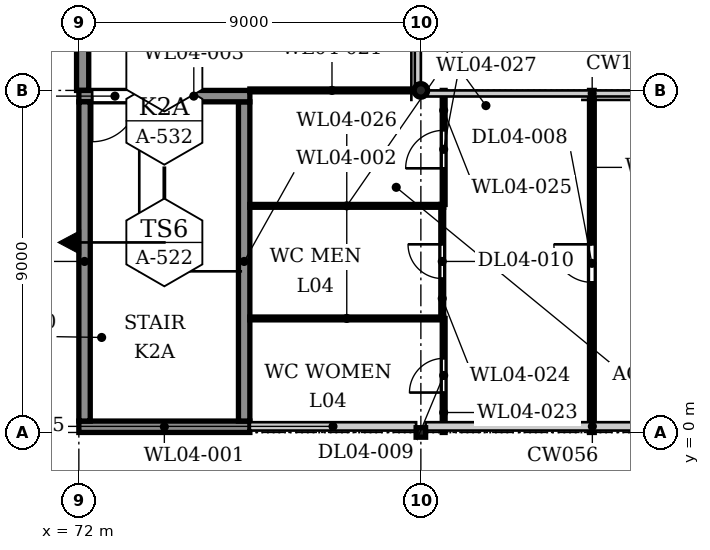
"""IFC4 building model, lengths in metres.
Left out: names, types, materials, properties, quantities, classifications, styles, units other than length and angle.
Written with IfcOpenShell. Run it as: python <this file> out.ifc"""

import sys

from ifc_helpers import new_model, si_unit, direction, frame, frame_2d, origin, origin_2d, place, context, subcontext, project, spatial, polyline, rectangle, hollow_rectangle, hollow_circle, outline, extrude, element, fill, save


model = new_model("IFC4")
c1 = context("Model", 3, precision=1e-05, world=origin(), true_north=direction((0.0, 1.0)))
c2 = subcontext(c1, "Body", "Model", "MODEL_VIEW")
j1 = project(units=[si_unit("LENGTHUNIT", "METRE"), si_unit("PLANEANGLEUNIT", "RADIAN")], contexts=[c1])
p1 = place(None, origin())
s1 = spatial("IfcSite", under=j1, at=p1, CompositionType="ELEMENT")
p2 = place(p1, origin())
s2 = spatial("IfcBuilding", under=s1, at=p2, CompositionType="ELEMENT")
p3 = place(p2, frame((0.0, 0.0, 21.2)))
s3 = spatial("IfcBuildingStorey", under=s2, at=p3, CompositionType="ELEMENT", Elevation=21.2)
p4 = place(p3, frame((81.0, 0.0, 0.0), z_axis=(0.0, 0.0, 1.0), x_axis=(1.0, 0.0, 0.0)))
e1 = element("IfcColumn", 1, at=p4, inside=s3, PredefinedType="COLUMN", context=c2, shape_type="SweptSolid", body=[
    extrude(hollow_rectangle(XDim=0.25, YDim=0.25, WallThickness=0.01, InnerFilletRadius=0.015, OuterFilletRadius=0.025, at=origin_2d()), origin(), (0.0, 0.0, 1.0), 3.6),
])
p5 = place(p3, frame((81.0, 9.0, 0.0), z_axis=(0.0, 0.0, 1.0), x_axis=(1.0, 0.0, 0.0)))
e2 = element("IfcColumn", 2, at=p5, inside=s3, PredefinedType="COLUMN", context=c2, shape_type="SweptSolid", body=[
    extrude(hollow_circle(Radius=0.178, WallThickness=0.013, at=origin_2d()), origin(), (0.0, 0.0, 1.0), 3.6),
])
p6 = place(p3, frame((72.1, 9.0, 0.0), z_axis=(0.0, 0.0, 1.0), x_axis=(0.0, 1.0, 0.0)))
e3 = element("IfcWall", 3, at=p6, inside=s3, PredefinedType="SOLIDWALL", context=c2, shape_type="SweptSolid", body=[
    extrude(rectangle(XDim=8.875, YDim=0.32, at=frame_2d((4.438, 0.0))), origin(), (0.0, 0.0, 1.0), 3.878),
])
p7 = place(p3, frame((72.1, 9.175, 3.878), z_axis=(0.0, 0.0, 1.0), x_axis=(0.0, 1.0, 0.0)))
e4 = element("IfcWall", 4, at=p7, inside=s3, PredefinedType="SOLIDWALL", context=c2, shape_type="SweptSolid", body=[
    extrude(outline(polyline([(0.0, 0.0), (8.825, 0.0), (8.825, 0.05), (0.0, 1.6), (0.0, 0.0)])), frame((0.0, 0.05, 0.0), z_axis=(0.0, -1.0, 0.0), x_axis=(1.0, 0.0, 0.0)), (0.0, 0.0, 1.0), 0.1),
])
p8 = place(p3, frame((72.0, 0.15, 0.0), z_axis=(0.0, 0.0, 1.0), x_axis=(1.0, 0.0, 0.0)))
e5 = element("IfcWall", 5, at=p8, inside=s3, PredefinedType="SOLIDWALL", context=c2, shape_type="SweptSolid", body=[
    extrude(rectangle(XDim=4.5, YDim=0.3, at=frame_2d((2.25, 0.0))), origin(), (0.0, 0.0, 1.0), 3.628),
])
p9 = place(p3, frame((76.35, 0.3, 0.0), z_axis=(0.0, 0.0, 1.0), x_axis=(0.0, 1.0, 0.0)))
e6 = element("IfcWall", 6, at=p9, inside=s3, PredefinedType="SOLIDWALL", context=c2, shape_type="SweptSolid", body=[
    extrude(rectangle(XDim=8.4, YDim=0.3, at=frame_2d((4.2, 0.0))), origin(), (0.0, 0.0, 1.0), 3.628),
])
p10 = place(p3, frame((72.0, 8.85, 0.0), z_axis=(0.0, 0.0, 1.0), x_axis=(1.0, 0.0, 0.0)))
e7 = element("IfcWall", 7, at=p10, inside=s3, PredefinedType="SOLIDWALL", context=c2, shape_type="SweptSolid", body=[
    extrude(rectangle(XDim=4.5, YDim=0.3, at=frame_2d((2.25, 0.0))), origin(), (0.0, 0.0, 1.0), 3.628),
])
p11 = place(p10, frame((0.35, 0.0, 0.0)))
e8 = element("IfcOpeningElement", 8, at=p11, cuts=e7, PredefinedType="OPENING", context=c2, shape_type="SweptSolid", body=[
    extrude(rectangle(XDim=1.2, YDim=2.1, at=frame_2d((0.6, 1.05))), frame((0.0, 0.16, 0.0), z_axis=(0.0, -1.0, 0.0), x_axis=(1.0, 0.0, 0.0)), (0.0, 0.0, 1.0), 0.32),
])
p12 = place(p3, frame((72.15, 0.3, 0.0), z_axis=(0.0, 0.0, 1.0), x_axis=(0.0, 1.0, 0.0)))
e9 = element("IfcWall", 9, at=p12, inside=s3, PredefinedType="SOLIDWALL", context=c2, shape_type="SweptSolid", body=[
    extrude(rectangle(XDim=8.4, YDim=0.3, at=frame_2d((4.2, 0.0))), origin(), (0.0, 0.0, 1.0), 3.628),
])
p13 = place(p3, frame((85.5, 0.0, 0.0), z_axis=(0.0, 0.0, 1.0), x_axis=(0.0, 1.0, 0.0)))
e10 = element("IfcWall", 10, at=p13, inside=s3, PredefinedType="PARTITIONING", context=c2, shape_type="SweptSolid", body=[
    extrude(rectangle(XDim=9.0, YDim=0.125, at=frame_2d((4.5, 0.0))), origin(), (0.0, 0.0, 1.0), 3.54),
])
p14 = place(p13, frame((3.95, 0.0, 0.0)))
e11 = element("IfcOpeningElement", 11, at=p14, cuts=e10, PredefinedType="OPENING", context=c2, shape_type="SweptSolid", body=[
    extrude(rectangle(XDim=1.0, YDim=2.1, at=frame_2d((0.5, 1.05))), frame((0.0, 0.073, 0.0), z_axis=(0.0, -1.0, 0.0), x_axis=(1.0, 0.0, 0.0)), (0.0, 0.0, 1.0), 0.145),
])
p15 = place(p3, frame((76.5, 9.0, 0.0), z_axis=(0.0, 0.0, 1.0), x_axis=(1.0, 0.0, 0.0)))
e12 = element("IfcWall", 12, at=p15, inside=s3, PredefinedType="PARTITIONING", context=c2, shape_type="SweptSolid", body=[
    extrude(rectangle(XDim=4.322, YDim=0.075, at=frame_2d((2.161, 0.0))), origin(), (0.0, 0.0, 1.0), 3.54),
])
p16 = place(p3, frame((81.6, 0.0, 0.0), z_axis=(0.0, 0.0, 1.0), x_axis=(0.0, 1.0, 0.0)))
e13 = element("IfcWall", 13, at=p16, inside=s3, PredefinedType="PARTITIONING", context=c2, shape_type="SweptSolid", body=[
    extrude(rectangle(XDim=3.0, YDim=0.075, at=frame_2d((1.5, 0.0))), origin(), (0.0, 0.0, 1.0), 3.6),
])
p17 = place(p16, frame((1.05, 0.0, 0.0)))
e14 = element("IfcOpeningElement", 14, at=p17, cuts=e13, PredefinedType="OPENING", context=c2, shape_type="SweptSolid", body=[
    extrude(rectangle(XDim=0.9, YDim=2.1, at=frame_2d((0.45, 1.05))), frame((0.0, 0.047, 0.0), z_axis=(0.0, -1.0, 0.0), x_axis=(1.0, 0.0, 0.0)), (0.0, 0.0, 1.0), 0.095),
])
p18 = place(p3, frame((81.562, 3.0, 0.0), z_axis=(0.0, 0.0, 1.0), x_axis=(0.0, 1.0, 0.0)))
e15 = element("IfcWall", 15, at=p18, inside=s3, PredefinedType="PARTITIONING", context=c2, shape_type="SweptSolid", body=[
    extrude(rectangle(XDim=3.0, YDim=0.075, at=frame_2d((1.5, 0.0))), origin(), (0.0, 0.0, 1.0), 4.051),
])
p19 = place(p18, frame((1.05, 0.0, 0.0)))
e16 = element("IfcOpeningElement", 16, at=p19, cuts=e15, PredefinedType="OPENING", context=c2, shape_type="SweptSolid", body=[
    extrude(rectangle(XDim=0.9, YDim=2.1, at=frame_2d((0.45, 1.05))), frame((0.0, 0.047, 0.0), z_axis=(0.0, -1.0, 0.0), x_axis=(1.0, 0.0, 0.0)), (0.0, 0.0, 1.0), 0.095),
])
p20 = place(p3, frame((81.6, 6.0, 0.0), z_axis=(0.0, 0.0, 1.0), x_axis=(0.0, 1.0, 0.0)))
e17 = element("IfcWall", 17, at=p20, inside=s3, PredefinedType="PARTITIONING", context=c2, shape_type="SweptSolid", body=[
    extrude(rectangle(XDim=3.0, YDim=0.075, at=frame_2d((1.5, 0.0))), origin(), (0.0, 0.0, 1.0), 3.54),
])
p21 = place(p20, frame((0.95, 0.0, 0.0)))
e18 = element("IfcOpeningElement", 18, at=p21, cuts=e17, PredefinedType="OPENING", context=c2, shape_type="SweptSolid", body=[
    extrude(rectangle(XDim=1.0, YDim=2.1, at=frame_2d((0.5, 1.05))), frame((0.0, 0.047, 0.0), z_axis=(0.0, -1.0, 0.0), x_axis=(1.0, 0.0, 0.0)), (0.0, 0.0, 1.0), 0.095),
])
for number, where, z_axis, x_axis in (
    (19, (76.5, 3.0, 0.0), (0.0, 0.0, 1.0), (1.0, 0.0, 0.0)),
    (20, (76.5, 5.962, 0.0), (0.0, 0.0, 1.0), (1.0, 0.0, 0.0)),
):
    element("IfcWall", number, at=place(p3, frame(where, z_axis=z_axis, x_axis=x_axis)), inside=s3, PredefinedType="PARTITIONING", context=c2, shape_type="SweptSolid", body=[
        extrude(rectangle(XDim=5.1, YDim=0.075, at=frame_2d((2.55, 0.0))), origin(), (0.0, 0.0, 1.0), 4.051),
    ])
p22 = place(p2, frame((0.0, 0.0, 25.2)))
p23 = place(p22, frame((76.85, 0.125, -0.146), z_axis=(0.0, 0.0, 1.0), x_axis=(1.0, 0.0, 0.0)))
p24 = place(p23, frame((4.6, 0.0, 0.15)))
p25 = place(p24, origin())
e21 = element("IfcWindow", 21, at=p25, inside=s3, PartitioningType="SINGLE_PANEL", PredefinedType="SKYLIGHT", context=c2, shape_type="SweptSolid", body=[
    extrude(rectangle(XDim=3.6, YDim=1.0, at=frame_2d((1.8, 0.5))), frame((0.0, 0.03, 0.0), z_axis=(0.0, -1.0, 0.0), x_axis=(1.0, 0.0, 0.0)), (0.0, 0.0, 1.0), 0.06),
])
p26 = place(p23, frame((9.1, 0.0, 0.15)))
p27 = place(p26, origin())
e22 = element("IfcWindow", 22, at=p27, inside=s3, PartitioningType="SINGLE_PANEL", PredefinedType="SKYLIGHT", context=c2, shape_type="SweptSolid", body=[
    extrude(rectangle(XDim=3.6, YDim=1.0, at=frame_2d((1.8, 0.5))), frame((0.0, 0.03, 0.0), z_axis=(0.0, -1.0, 0.0), x_axis=(1.0, 0.0, 0.0)), (0.0, 0.0, 1.0), 0.06),
])
p28 = place(p22, frame((72.0, 9.125, -0.146), z_axis=(0.0, 0.0, 1.0), x_axis=(1.0, 0.0, 0.0)))
p29 = place(p28, frame((0.45, 0.0, 0.15)))
p30 = place(p29, origin())
e23 = element("IfcWindow", 23, at=p30, inside=s3, PartitioningType="SINGLE_PANEL", PredefinedType="SKYLIGHT", context=c2, shape_type="SweptSolid", body=[
    extrude(rectangle(XDim=3.6, YDim=1.0, at=frame_2d((1.8, 0.5))), frame((0.0, 0.03, 0.0), z_axis=(0.0, -1.0, 0.0), x_axis=(1.0, 0.0, 0.0)), (0.0, 0.0, 1.0), 0.06),
])
p31 = place(p28, frame((4.95, 0.0, 0.15)))
p32 = place(p31, origin())
e24 = element("IfcWindow", 24, at=p32, inside=s3, PartitioningType="SINGLE_PANEL", PredefinedType="SKYLIGHT", context=c2, shape_type="SweptSolid", body=[
    extrude(rectangle(XDim=3.6, YDim=1.0, at=frame_2d((1.8, 0.5))), frame((0.0, 0.03, 0.0), z_axis=(0.0, -1.0, 0.0), x_axis=(1.0, 0.0, 0.0)), (0.0, 0.0, 1.0), 0.06),
])
p33 = place(p22, frame((81.0, 9.125, -0.146), z_axis=(0.0, 0.0, 1.0), x_axis=(1.0, 0.0, 0.0)))
p34 = place(p33, frame((0.45, 0.0, 0.15)))
p35 = place(p34, origin())
e25 = element("IfcWindow", 25, at=p35, inside=s3, PartitioningType="SINGLE_PANEL", PredefinedType="SKYLIGHT", context=c2, shape_type="SweptSolid", body=[
    extrude(rectangle(XDim=3.6, YDim=1.0, at=frame_2d((1.8, 0.5))), frame((0.0, 0.03, 0.0), z_axis=(0.0, -1.0, 0.0), x_axis=(1.0, 0.0, 0.0)), (0.0, 0.0, 1.0), 0.06),
])
p36 = place(p33, frame((4.95, 0.0, 0.15)))
p37 = place(p36, origin())
e26 = element("IfcWindow", 26, at=p37, inside=s3, PartitioningType="SINGLE_PANEL", PredefinedType="SKYLIGHT", context=c2, shape_type="SweptSolid", body=[
    extrude(rectangle(XDim=3.6, YDim=1.0, at=frame_2d((1.8, 0.5))), frame((0.0, 0.03, 0.0), z_axis=(0.0, -1.0, 0.0), x_axis=(1.0, 0.0, 0.0)), (0.0, 0.0, 1.0), 0.06),
])
p38 = place(p22, frame((0.0, 0.0, -0.122)))
p39 = place(p38, frame((73.5, 4.5, -0.01)))
p40 = place(p39, frame((0.0, 0.0, 0.36)))
e27 = element("IfcDoor", 27, at=p40, inside=s3, OperationType="SINGLE_SWING_LEFT", PredefinedType="TRAPDOOR", context=c2, shape_type="SweptSolid", body=[
    extrude(rectangle(XDim=0.9, YDim=1.2, at=origin_2d()), origin(), (0.0, 0.0, 1.0), 0.05),
])
p41 = place(p11, frame((1.2, 0.0, 0.0), z_axis=(0.0, 0.0, 1.0), x_axis=(-1.0, 0.0, 0.0)))
e28 = element("IfcDoor", 28, at=p41, inside=s3, OperationType="SINGLE_SWING_LEFT", PredefinedType="DOOR", context=c2, shape_type="SweptSolid", body=[
    extrude(rectangle(XDim=1.2, YDim=2.1, at=frame_2d((0.6, 1.05))), frame((0.0, 0.025, 0.0), z_axis=(0.0, -1.0, 0.0), x_axis=(1.0, 0.0, 0.0)), (0.0, 0.0, 1.0), 0.05),
])
fill(e8, e28)
p42 = place(p14, origin())
e29 = element("IfcDoor", 29, at=p42, inside=s3, OperationType="SINGLE_SWING_LEFT", PredefinedType="DOOR", context=c2, shape_type="SweptSolid", body=[
    extrude(rectangle(XDim=1.0, YDim=2.1, at=frame_2d((0.5, 1.05))), frame((0.0, 0.025, 0.0), z_axis=(0.0, -1.0, 0.0), x_axis=(1.0, 0.0, 0.0)), (0.0, 0.0, 1.0), 0.05),
])
fill(e11, e29)
p43 = place(p17, origin())
e30 = element("IfcDoor", 30, at=p43, inside=s3, OperationType="SINGLE_SWING_RIGHT", PredefinedType="DOOR", context=c2, shape_type="SweptSolid", body=[
    extrude(rectangle(XDim=0.9, YDim=2.1, at=frame_2d((0.45, 1.05))), frame((0.0, 0.025, 0.0), z_axis=(0.0, -1.0, 0.0), x_axis=(1.0, 0.0, 0.0)), (0.0, 0.0, 1.0), 0.05),
])
fill(e14, e30)
p44 = place(p19, origin())
e31 = element("IfcDoor", 31, at=p44, inside=s3, OperationType="SINGLE_SWING_LEFT", PredefinedType="DOOR", context=c2, shape_type="SweptSolid", body=[
    extrude(rectangle(XDim=0.9, YDim=2.1, at=frame_2d((0.45, 1.05))), frame((0.0, 0.025, 0.0), z_axis=(0.0, -1.0, 0.0), x_axis=(1.0, 0.0, 0.0)), (0.0, 0.0, 1.0), 0.05),
])
fill(e16, e31)
p45 = place(p21, origin())
e32 = element("IfcDoor", 32, at=p45, inside=s3, OperationType="SINGLE_SWING_RIGHT", PredefinedType="DOOR", context=c2, shape_type="SweptSolid", body=[
    extrude(rectangle(XDim=1.0, YDim=2.1, at=frame_2d((0.5, 1.05))), frame((0.0, 0.025, 0.0), z_axis=(0.0, -1.0, 0.0), x_axis=(1.0, 0.0, 0.0)), (0.0, 0.0, 1.0), 0.05),
])
fill(e18, e32)
save(model, sys.argv[1])
